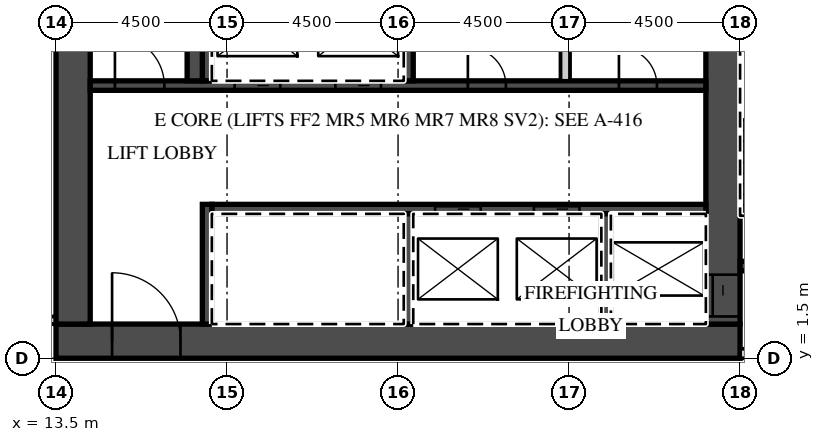
"""IFC4 building model, lengths in metres.
Left out: names, types, materials, properties, quantities, classifications, styles, units other than length and angle.
Written with IfcOpenShell. Run it as: python <this file> out.ifc"""

import sys

from ifc_helpers import new_model, si_unit, direction, frame, frame_2d, origin, place, context, subcontext, project, spatial, rectangle, extrude, element, fill, save


model = new_model("IFC4")
c1 = context("Model", 3, precision=1e-05, world=origin(), true_north=direction((0.0, 1.0)))
c2 = subcontext(c1, "Body", "Model", "MODEL_VIEW")
j1 = project(units=[si_unit("LENGTHUNIT", "METRE"), si_unit("PLANEANGLEUNIT", "RADIAN")], contexts=[c1])
p1 = place(None, origin())
s1 = spatial("IfcSite", under=j1, at=p1, CompositionType="ELEMENT")
p2 = place(p1, origin())
s2 = spatial("IfcBuilding", under=s1, at=p2, CompositionType="ELEMENT")
p3 = place(p2, frame((0.0, 0.0, 217.7)))
s3 = spatial("IfcBuildingStorey", under=s2, at=p3, CompositionType="ELEMENT", Elevation=217.7)
p4 = place(p3, frame((-13.5, 2.5, 0.0), z_axis=(0.0, 0.0, 1.0), x_axis=(1.0, 0.0, 0.0)))
e1 = element("IfcWall", 1, at=p4, inside=s3, PredefinedType="PARTITIONING", context=c2, shape_type="SweptSolid", body=[
    extrude(rectangle(XDim=27.0, YDim=0.2, at=frame_2d((13.5, 0.0))), origin(), (0.0, 0.0, 1.0), 3.02),
])
p5 = place(p4, frame((2.925, 0.0, 0.0)))
e2 = element("IfcOpeningElement", 2, at=p5, cuts=e1, PredefinedType="OPENING", context=c2, shape_type="SweptSolid", body=[
    extrude(rectangle(XDim=1.0, YDim=2.1, at=frame_2d((0.5, 1.05))), frame((0.0, 0.11, 0.0), z_axis=(0.0, -1.0, 0.0), x_axis=(1.0, 0.0, 0.0)), (0.0, 0.0, 1.0), 0.22),
])
p6 = place(p4, frame((7.45, 0.0, 0.0)))
e3 = element("IfcOpeningElement", 3, at=p6, cuts=e1, PredefinedType="OPENING", context=c2, shape_type="SweptSolid", body=[
    extrude(rectangle(XDim=1.0, YDim=2.1, at=frame_2d((0.5, 1.05))), frame((0.0, 0.11, 0.0), z_axis=(0.0, -1.0, 0.0), x_axis=(1.0, 0.0, 0.0)), (0.0, 0.0, 1.0), 0.22),
])
p7 = place(p4, frame((11.925, 0.0, 0.0)))
e4 = element("IfcOpeningElement", 4, at=p7, cuts=e1, PredefinedType="OPENING", context=c2, shape_type="SweptSolid", body=[
    extrude(rectangle(XDim=1.0, YDim=2.1, at=frame_2d((0.5, 1.05))), frame((0.0, 0.11, 0.0), z_axis=(0.0, -1.0, 0.0), x_axis=(1.0, 0.0, 0.0)), (0.0, 0.0, 1.0), 0.22),
])
p8 = place(p4, frame((14.075, 0.0, 0.0)))
e5 = element("IfcOpeningElement", 5, at=p8, cuts=e1, PredefinedType="OPENING", context=c2, shape_type="SweptSolid", body=[
    extrude(rectangle(XDim=1.0, YDim=2.1, at=frame_2d((0.5, 1.05))), frame((0.0, 0.11, 0.0), z_axis=(0.0, -1.0, 0.0), x_axis=(1.0, 0.0, 0.0)), (0.0, 0.0, 1.0), 0.22),
])
p9 = place(p4, frame((20.925, 0.0, 0.0)))
e6 = element("IfcOpeningElement", 6, at=p9, cuts=e1, PredefinedType="OPENING", context=c2, shape_type="SweptSolid", body=[
    extrude(rectangle(XDim=1.0, YDim=2.1, at=frame_2d((0.5, 1.05))), frame((0.0, 0.11, 0.0), z_axis=(0.0, -1.0, 0.0), x_axis=(1.0, 0.0, 0.0)), (0.0, 0.0, 1.0), 0.22),
])
p10 = place(p4, frame((25.425, 0.0, 0.0)))
e7 = element("IfcOpeningElement", 7, at=p10, cuts=e1, PredefinedType="OPENING", context=c2, shape_type="SweptSolid", body=[
    extrude(rectangle(XDim=1.0, YDim=2.1, at=frame_2d((0.5, 1.05))), frame((0.0, 0.11, 0.0), z_axis=(0.0, -1.0, 0.0), x_axis=(1.0, 0.0, 0.0)), (0.0, 0.0, 1.0), 0.22),
])
p11 = place(p3, frame((13.5, 1.95, 0.0), z_axis=(0.0, 0.0, 1.0), x_axis=(1.0, 0.0, 0.0)))
e8 = element("IfcWall", 8, at=p11, inside=s3, PredefinedType="SHEAR", context=c2, shape_type="SweptSolid", body=[
    extrude(rectangle(XDim=18.0, YDim=0.9, at=frame_2d((9.0, 0.0))), origin(), (0.0, 0.0, 1.0), 3.02),
])
p12 = place(p11, frame((1.475, 0.0, 0.0)))
e9 = element("IfcOpeningElement", 9, at=p12, cuts=e8, PredefinedType="OPENING", context=c2, shape_type="SweptSolid", body=[
    extrude(rectangle(XDim=1.8, YDim=2.1, at=frame_2d((0.9, 1.05))), frame((0.0, 0.46, 0.0), z_axis=(0.0, -1.0, 0.0), x_axis=(1.0, 0.0, 0.0)), (0.0, 0.0, 1.0), 0.92),
])
p13 = place(p3, frame((31.05, 2.4, 0.0), z_axis=(0.0, 0.0, 1.0), x_axis=(0.0, 1.0, 0.0)))
e10 = element("IfcWall", 10, at=p13, inside=s3, PredefinedType="SHEAR", context=c2, shape_type="SweptSolid", body=[
    extrude(rectangle(XDim=12.8, YDim=0.9, at=frame_2d((6.4, 0.0))), origin(), (0.0, 0.0, 1.0), 3.02),
])
p14 = place(p13, frame((0.2, 0.0, 0.0)))
e11 = element("IfcOpeningElement", 11, at=p14, cuts=e10, PredefinedType="OPENING", context=c2, shape_type="SweptSolid", body=[
    extrude(rectangle(XDim=1.1, YDim=2.1, at=frame_2d((0.55, 1.05))), frame((0.0, 0.46, 0.0), z_axis=(0.0, -1.0, 0.0), x_axis=(1.0, 0.0, 0.0)), (0.0, 0.0, 1.0), 0.92),
])
p15 = place(p3, frame((13.95, 2.4, 0.0), z_axis=(0.0, 0.0, 1.0), x_axis=(0.0, 1.0, 0.0)))
e12 = element("IfcWall", 12, at=p15, inside=s3, PredefinedType="SHEAR", context=c2, shape_type="SweptSolid", body=[
    extrude(rectangle(XDim=12.2, YDim=0.9, at=frame_2d((6.1, 0.0))), origin(), (0.0, 0.0, 1.0), 3.02),
])
p16 = place(p3, frame((17.6, 5.425, 0.0), z_axis=(0.0, 0.0, 1.0), x_axis=(1.0, 0.0, 0.0)))
e13 = element("IfcWall", 13, at=p16, inside=s3, PredefinedType="SHEAR", context=c2, shape_type="SweptSolid", body=[
    extrude(rectangle(XDim=13.0, YDim=0.25, at=frame_2d((6.5, 0.0))), origin(), (0.0, 0.0, 1.0), 3.02),
])
p17 = place(p16, frame((8.475, 0.0, 0.0)))
e14 = element("IfcOpeningElement", 14, at=p17, cuts=e13, PredefinedType="OPENING", context=c2, shape_type="SweptSolid", body=[
    extrude(rectangle(XDim=1.2, YDim=2.1, at=frame_2d((0.6, 1.05))), frame((0.0, 0.135, 0.0), z_axis=(0.0, -1.0, 0.0), x_axis=(1.0, 0.0, 0.0)), (0.0, 0.0, 1.0), 0.27),
])
p18 = place(p16, frame((5.875, 0.0, 0.0)))
e15 = element("IfcOpeningElement", 15, at=p18, cuts=e13, PredefinedType="OPENING", context=c2, shape_type="SweptSolid", body=[
    extrude(rectangle(XDim=1.2, YDim=2.1, at=frame_2d((0.6, 1.05))), frame((0.0, 0.135, 0.0), z_axis=(0.0, -1.0, 0.0), x_axis=(1.0, 0.0, 0.0)), (0.0, 0.0, 1.0), 0.27),
])
p19 = place(p3, frame((17.475, 2.4, 0.0), z_axis=(0.0, 0.0, 1.0), x_axis=(0.0, 1.0, 0.0)))
e16 = element("IfcWall", 16, at=p19, inside=s3, PredefinedType="SHEAR", context=c2, shape_type="SweptSolid", body=[
    extrude(rectangle(XDim=3.15, YDim=0.25, at=frame_2d((1.575, 0.0))), origin(), (0.0, 0.0, 1.0), 3.02),
])
for number, where, z_axis, x_axis in (
    (17, (27.975, 2.4, 0.0), (0.0, 0.0, 1.0), (0.0, 1.0, 0.0)),
    (18, (22.775, 2.4, 0.0), (0.0, 0.0, 1.0), (0.0, 1.0, 0.0)),
):
    element("IfcWall", number, at=place(p3, frame(where, z_axis=z_axis, x_axis=x_axis)), inside=s3, PredefinedType="SHEAR", context=c2, shape_type="SweptSolid", body=[
        extrude(rectangle(XDim=2.9, YDim=0.25, at=frame_2d((1.45, 0.0))), origin(), (0.0, 0.0, 1.0), 3.02),
    ])
p20 = place(p3, frame((14.4, 8.675, 0.0), z_axis=(0.0, 0.0, 1.0), x_axis=(1.0, 0.0, 0.0)))
e19 = element("IfcWall", 19, at=p20, inside=s3, PredefinedType="SHEAR", context=c2, shape_type="SweptSolid", body=[
    extrude(rectangle(XDim=16.2, YDim=0.25, at=frame_2d((8.1, 0.0))), origin(), (0.0, 0.0, 1.0), 3.02),
])
p21 = place(p20, frame((6.45, 0.0, 0.0)))
e20 = element("IfcOpeningElement", 20, at=p21, cuts=e19, PredefinedType="OPENING", context=c2, shape_type="SweptSolid", body=[
    extrude(rectangle(XDim=1.2, YDim=2.1, at=frame_2d((0.6, 1.05))), frame((0.0, 0.135, 0.0), z_axis=(0.0, -1.0, 0.0), x_axis=(1.0, 0.0, 0.0)), (0.0, 0.0, 1.0), 0.27),
])
p22 = place(p20, frame((3.8, 0.0, 0.0)))
e21 = element("IfcOpeningElement", 21, at=p22, cuts=e19, PredefinedType="OPENING", context=c2, shape_type="SweptSolid", body=[
    extrude(rectangle(XDim=1.2, YDim=2.1, at=frame_2d((0.6, 1.05))), frame((0.0, 0.135, 0.0), z_axis=(0.0, -1.0, 0.0), x_axis=(1.0, 0.0, 0.0)), (0.0, 0.0, 1.0), 0.27),
])
p23 = place(p20, frame((0.65, 0.0, 0.0)))
e22 = element("IfcOpeningElement", 22, at=p23, cuts=e19, PredefinedType="OPENING", context=c2, shape_type="SweptSolid", body=[
    extrude(rectangle(XDim=1.3, YDim=2.1, at=frame_2d((0.65, 1.05))), frame((0.0, 0.135, 0.0), z_axis=(0.0, -1.0, 0.0), x_axis=(1.0, 0.0, 0.0)), (0.0, 0.0, 1.0), 0.27),
])
p24 = place(p20, frame((13.913, 0.0, 0.0)))
e23 = element("IfcOpeningElement", 23, at=p24, cuts=e19, PredefinedType="OPENING", context=c2, shape_type="SweptSolid", body=[
    extrude(rectangle(XDim=1.0, YDim=2.1, at=frame_2d((0.5, 1.05))), frame((0.0, 0.135, 0.0), z_axis=(0.0, -1.0, 0.0), x_axis=(1.0, 0.0, 0.0)), (0.0, 0.0, 1.0), 0.27),
])
p25 = place(p20, frame((9.938, 0.0, 0.0)))
e24 = element("IfcOpeningElement", 24, at=p25, cuts=e19, PredefinedType="OPENING", context=c2, shape_type="SweptSolid", body=[
    extrude(rectangle(XDim=1.0, YDim=2.1, at=frame_2d((0.5, 1.05))), frame((0.0, 0.135, 0.0), z_axis=(0.0, -1.0, 0.0), x_axis=(1.0, 0.0, 0.0)), (0.0, 0.0, 1.0), 0.27),
])
for number, where, z_axis, x_axis in (
    (25, (17.475, 8.8, 0.0), (0.0, 0.0, 1.0), (0.0, 1.0, 0.0)),
    (26, (22.775, 8.8, 0.0), (0.0, 0.0, 1.0), (0.0, 1.0, 0.0)),
):
    element("IfcWall", number, at=place(p3, frame(where, z_axis=z_axis, x_axis=x_axis)), inside=s3, PredefinedType="SHEAR", context=c2, shape_type="SweptSolid", body=[
        extrude(rectangle(XDim=2.9, YDim=0.25, at=frame_2d((1.45, 0.0))), origin(), (0.0, 0.0, 1.0), 3.02),
    ])
p26 = place(p3, frame((26.9, 8.8, 0.0), z_axis=(0.0, 0.0, 1.0), x_axis=(0.0, 1.0, 0.0)))
e27 = element("IfcWall", 27, at=p26, inside=s3, PredefinedType="PARTITIONING", context=c2, shape_type="SweptSolid", body=[
    extrude(rectangle(XDim=2.9, YDim=0.25, at=frame_2d((1.45, 0.0))), origin(), (0.0, 0.0, 1.0), 3.02),
])
p27 = place(p3, frame((17.15, 8.8, 0.0), z_axis=(0.0, 0.0, 1.0), x_axis=(0.0, 1.0, 0.0)))
e28 = element("IfcWall", 28, at=p27, inside=s3, PredefinedType="SHEAR", context=c2, shape_type="SweptSolid", body=[
    extrude(rectangle(XDim=5.8, YDim=0.4, at=frame_2d((2.9, 0.0))), origin(), (0.0, 0.0, 1.0), 3.02),
])
p28 = place(p3, frame((31.5, 1.625, 0.0), z_axis=(0.0, 0.0, 1.0), x_axis=(1.0, 0.0, 0.0)))
e29 = element("IfcWall", 29, at=p28, inside=s3, PredefinedType="PARTITIONING", context=c2, shape_type="SweptSolid", body=[
    extrude(rectangle(XDim=11.04, YDim=0.25, at=frame_2d((5.52, 0.0))), origin(), (0.0, 0.0, 1.0), 3.02),
])
p29 = place(p28, frame((0.625, 0.0, 0.0)))
e30 = element("IfcOpeningElement", 30, at=p29, cuts=e29, PredefinedType="OPENING", context=c2, shape_type="SweptSolid", body=[
    extrude(rectangle(XDim=1.3, YDim=2.1, at=frame_2d((0.65, 1.05))), frame((0.0, 0.135, 0.0), z_axis=(0.0, -1.0, 0.0), x_axis=(1.0, 0.0, 0.0)), (0.0, 0.0, 1.0), 0.27),
])
p30 = place(p28, frame((3.25, 0.0, 0.0)))
e31 = element("IfcOpeningElement", 31, at=p30, cuts=e29, PredefinedType="OPENING", context=c2, shape_type="SweptSolid", body=[
    extrude(rectangle(XDim=1.1, YDim=2.1, at=frame_2d((0.55, 1.05))), frame((0.0, 0.135, 0.0), z_axis=(0.0, -1.0, 0.0), x_axis=(1.0, 0.0, 0.0)), (0.0, 0.0, 1.0), 0.27),
])
p31 = place(p3, frame((31.5, 3.925, 0.0), z_axis=(0.0, 0.0, 1.0), x_axis=(1.0, 0.0, 0.0)))
e32 = element("IfcWall", 32, at=p31, inside=s3, PredefinedType="SHEAR", context=c2, shape_type="SweptSolid", body=[
    extrude(rectangle(XDim=2.55, YDim=0.25, at=frame_2d((1.275, 0.0))), origin(), (0.0, 0.0, 1.0), 3.02),
])
p32 = place(p31, frame((0.625, 0.0, 0.0)))
e33 = element("IfcOpeningElement", 33, at=p32, cuts=e32, PredefinedType="OPENING", context=c2, shape_type="SweptSolid", body=[
    extrude(rectangle(XDim=1.3, YDim=2.1, at=frame_2d((0.65, 1.05))), frame((0.0, 0.135, 0.0), z_axis=(0.0, -1.0, 0.0), x_axis=(1.0, 0.0, 0.0)), (0.0, 0.0, 1.0), 0.27),
])
p33 = place(p21, origin())
e34 = element("IfcDoor", 34, at=p33, inside=s3, OperationType="SLIDING_TO_LEFT", PredefinedType="DOOR", context=c2, shape_type="SweptSolid", body=[
    extrude(rectangle(XDim=1.2, YDim=2.1, at=frame_2d((0.6, 1.05))), frame((0.0, 0.025, 0.0), z_axis=(0.0, -1.0, 0.0), x_axis=(1.0, 0.0, 0.0)), (0.0, 0.0, 1.0), 0.05),
])
fill(e20, e34)
p34 = place(p22, origin())
e35 = element("IfcDoor", 35, at=p34, inside=s3, OperationType="SLIDING_TO_RIGHT", PredefinedType="DOOR", context=c2, shape_type="SweptSolid", body=[
    extrude(rectangle(XDim=1.2, YDim=2.1, at=frame_2d((0.6, 1.05))), frame((0.0, 0.025, 0.0), z_axis=(0.0, -1.0, 0.0), x_axis=(1.0, 0.0, 0.0)), (0.0, 0.0, 1.0), 0.05),
])
fill(e21, e35)
p35 = place(p17, origin())
e36 = element("IfcDoor", 36, at=p35, inside=s3, OperationType="SLIDING_TO_LEFT", PredefinedType="DOOR", context=c2, shape_type="SweptSolid", body=[
    extrude(rectangle(XDim=1.2, YDim=2.1, at=frame_2d((0.6, 1.05))), frame((0.0, 0.025, 0.0), z_axis=(0.0, -1.0, 0.0), x_axis=(1.0, 0.0, 0.0)), (0.0, 0.0, 1.0), 0.05),
])
fill(e14, e36)
p36 = place(p18, origin())
e37 = element("IfcDoor", 37, at=p36, inside=s3, OperationType="SLIDING_TO_RIGHT", PredefinedType="DOOR", context=c2, shape_type="SweptSolid", body=[
    extrude(rectangle(XDim=1.2, YDim=2.1, at=frame_2d((0.6, 1.05))), frame((0.0, 0.025, 0.0), z_axis=(0.0, -1.0, 0.0), x_axis=(1.0, 0.0, 0.0)), (0.0, 0.0, 1.0), 0.05),
])
fill(e15, e37)
p37 = place(p14, origin())
e38 = element("IfcDoor", 38, at=p37, inside=s3, OperationType="SLIDING_TO_LEFT", PredefinedType="DOOR", context=c2, shape_type="SweptSolid", body=[
    extrude(rectangle(XDim=1.1, YDim=2.1, at=frame_2d((0.55, 1.05))), frame((0.0, 0.025, 0.0), z_axis=(0.0, -1.0, 0.0), x_axis=(1.0, 0.0, 0.0)), (0.0, 0.0, 1.0), 0.05),
])
fill(e11, e38)
p38 = place(p12, origin())
e39 = element("IfcDoor", 39, at=p38, inside=s3, OperationType="DOUBLE_DOOR_DOUBLE_SWING", PredefinedType="DOOR", context=c2, shape_type="SweptSolid", body=[
    extrude(rectangle(XDim=1.8, YDim=2.1, at=frame_2d((0.9, 1.05))), frame((0.0, 0.025, 0.0), z_axis=(0.0, -1.0, 0.0), x_axis=(1.0, 0.0, 0.0)), (0.0, 0.0, 1.0), 0.05),
])
fill(e9, e39)
p39 = place(p23, origin())
e40 = element("IfcDoor", 40, at=p39, inside=s3, OperationType="SINGLE_SWING_LEFT", PredefinedType="DOOR", context=c2, shape_type="SweptSolid", body=[
    extrude(rectangle(XDim=1.3, YDim=2.1, at=frame_2d((0.65, 1.05))), frame((0.0, 0.025, 0.0), z_axis=(0.0, -1.0, 0.0), x_axis=(1.0, 0.0, 0.0)), (0.0, 0.0, 1.0), 0.05),
])
fill(e22, e40)
p40 = place(p24, origin())
e41 = element("IfcDoor", 41, at=p40, inside=s3, OperationType="SINGLE_SWING_LEFT", PredefinedType="DOOR", context=c2, shape_type="SweptSolid", body=[
    extrude(rectangle(XDim=1.0, YDim=2.1, at=frame_2d((0.5, 1.05))), frame((0.0, 0.025, 0.0), z_axis=(0.0, -1.0, 0.0), x_axis=(1.0, 0.0, 0.0)), (0.0, 0.0, 1.0), 0.05),
])
fill(e23, e41)
p41 = place(p25, origin())
e42 = element("IfcDoor", 42, at=p41, inside=s3, OperationType="SINGLE_SWING_LEFT", PredefinedType="DOOR", context=c2, shape_type="SweptSolid", body=[
    extrude(rectangle(XDim=1.0, YDim=2.1, at=frame_2d((0.5, 1.05))), frame((0.0, 0.025, 0.0), z_axis=(0.0, -1.0, 0.0), x_axis=(1.0, 0.0, 0.0)), (0.0, 0.0, 1.0), 0.05),
])
fill(e24, e42)
save(model, sys.argv[1])
